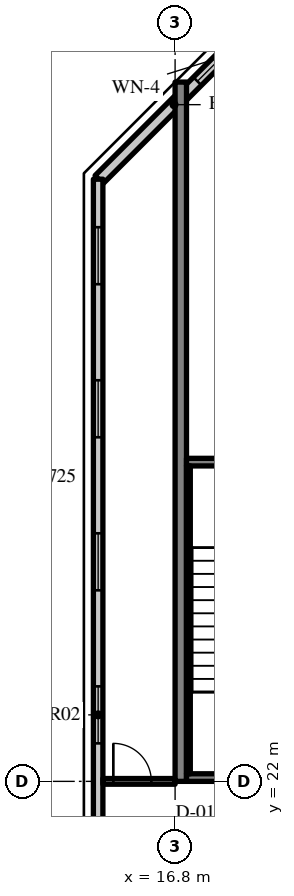
"""IFC4 building model, lengths in metres.
Left out: names, types, materials, properties, quantities, classifications, styles, units other than length and angle.
Written with IfcOpenShell. Run it as: python <this file> out.ifc"""

import sys

from ifc_helpers import new_model, si_unit, direction, frame, frame_2d, origin, place, context, subcontext, project, spatial, rectangle, extrude, source, transform, mapped, element, fill, save


model = new_model("IFC4")
c1 = context("Model", 3, precision=1e-05, world=origin(), true_north=direction((0.0, 1.0)))
c2 = subcontext(c1, "Body", "Model", "MODEL_VIEW")
j1 = project(units=[si_unit("LENGTHUNIT", "METRE"), si_unit("PLANEANGLEUNIT", "RADIAN")], contexts=[c1])
p1 = place(None, origin())
s1 = spatial("IfcSite", under=j1, at=p1, CompositionType="ELEMENT")
p2 = place(p1, origin())
s2 = spatial("IfcBuilding", under=s1, at=p2, CompositionType="ELEMENT")
p3 = place(p2, frame((0.0, 0.0, 237.4)))
s3 = spatial("IfcBuildingStorey", under=s2, at=p3, CompositionType="ELEMENT", Elevation=237.4)
m1 = source(origin(), c2, "Body", "SweptSolid", [
    extrude(rectangle(XDim=18.4, YDim=0.3, at=frame_2d((9.2, 0.0))), origin(), (0.0, 0.0, 1.0), 3.62),
])
p4 = place(p3, frame((16.95, 22.0, 0.0), z_axis=(0.0, 0.0, 1.0), x_axis=(0.0, 1.0, 0.0)))
e1 = element("IfcWall", 1, at=p4, inside=s3, PredefinedType="SHEAR", context=c2, shape_type="MappedRepresentation", body=[
    mapped(m1, transform((0.0, 0.0, 0.0), scale=1.0)),
])
m2 = source(origin(), c2, "Body", "SweptSolid", [
    extrude(rectangle(XDim=5.576, YDim=0.3, at=frame_2d((2.788, 0.0))), origin(), (0.0, 0.0, 1.0), 3.62),
])
p5 = place(p3, frame((18.743, 41.777, 0.0), z_axis=(0.0, 0.0, 1.0), x_axis=(-0.707106781187, -0.707106781187, 0.0)))
e2 = element("IfcWall", 2, at=p5, inside=s3, PredefinedType="SOLIDWALL", context=c2, shape_type="MappedRepresentation", body=[
    mapped(m2, transform((0.0, 0.0, 0.0), scale=1.0)),
])
m3 = source(origin(), c2, "Body", "SweptSolid", [
    extrude(rectangle(XDim=1.8, YDim=1.5, at=frame_2d((0.9, 0.75))), frame((0.0, 0.16, 0.0), z_axis=(0.0, -1.0, 0.0), x_axis=(1.0, 0.0, 0.0)), (0.0, 0.0, 1.0), 0.32),
])
p6 = place(p5, frame((0.118, 0.0, 0.9)))
e3 = element("IfcOpeningElement", 3, at=p6, cuts=e2, PredefinedType="OPENING", context=c2, shape_type="MappedRepresentation", body=[
    mapped(m3, transform((0.0, 0.0, 0.0), scale=1.0)),
])
m4 = source(origin(), c2, "Body", "SweptSolid", [
    extrude(rectangle(XDim=28.189, YDim=0.25, at=frame_2d((14.095, 0.0))), origin(), (0.0, 0.0, 1.0), 3.62),
])
p7 = place(p3, frame((14.775, 37.845, 0.0), z_axis=(0.0, 0.0, 1.0), x_axis=(0.0, -1.0, 0.0)))
e4 = element("IfcWall", 4, at=p7, inside=s3, PredefinedType="SOLIDWALL", context=c2, shape_type="MappedRepresentation", body=[
    mapped(m4, transform((0.0, 0.0, 0.0), scale=1.0)),
])
m5 = source(origin(), c2, "Body", "SweptSolid", [
    extrude(rectangle(XDim=1.5, YDim=1.5, at=frame_2d((0.75, 0.75))), frame((0.0, 0.135, 0.0), z_axis=(0.0, -1.0, 0.0), x_axis=(1.0, 0.0, 0.0)), (0.0, 0.0, 1.0), 0.27),
])
p8 = place(p7, frame((1.263, 0.0, 0.9)))
e5 = element("IfcOpeningElement", 5, at=p8, cuts=e4, PredefinedType="OPENING", context=c2, shape_type="MappedRepresentation", body=[
    mapped(m5, transform((0.0, 0.0, 0.0), scale=1.0)),
])
p9 = place(p7, frame((5.291, 0.0, 0.9)))
e6 = element("IfcOpeningElement", 6, at=p9, cuts=e4, PredefinedType="OPENING", context=c2, shape_type="MappedRepresentation", body=[
    mapped(m5, transform((0.0, 0.0, 0.0), scale=1.0)),
])
p10 = place(p7, frame((9.318, 0.0, 0.9)))
e7 = element("IfcOpeningElement", 7, at=p10, cuts=e4, PredefinedType="OPENING", context=c2, shape_type="MappedRepresentation", body=[
    mapped(m5, transform((0.0, 0.0, 0.0), scale=1.0)),
])
p11 = place(p7, frame((13.345, 0.0, 0.9)))
e8 = element("IfcOpeningElement", 8, at=p11, cuts=e4, PredefinedType="OPENING", context=c2, shape_type="MappedRepresentation", body=[
    mapped(m5, transform((0.0, 0.0, 0.0), scale=1.0)),
])
p12 = place(p7, frame((17.372, 0.0, 0.9)))
e9 = element("IfcOpeningElement", 9, at=p12, cuts=e4, PredefinedType="OPENING", context=c2, shape_type="MappedRepresentation", body=[
    mapped(m5, transform((0.0, 0.0, 0.0), scale=1.0)),
])
p13 = place(p7, frame((21.399, 0.0, 0.9)))
e10 = element("IfcOpeningElement", 10, at=p13, cuts=e4, PredefinedType="OPENING", context=c2, shape_type="MappedRepresentation", body=[
    mapped(m5, transform((0.0, 0.0, 0.0), scale=1.0)),
])
p14 = place(p7, frame((25.426, 0.0, 0.9)))
e11 = element("IfcOpeningElement", 11, at=p14, cuts=e4, PredefinedType="OPENING", context=c2, shape_type="MappedRepresentation", body=[
    mapped(m5, transform((0.0, 0.0, 0.0), scale=1.0)),
])
m6 = source(origin(), c2, "Body", "SweptSolid", [
    extrude(rectangle(XDim=8.1, YDim=0.2, at=frame_2d((4.05, 0.0))), origin(), (0.0, 0.0, 1.0), 3.62),
])
p15 = place(p3, frame((17.1, 22.1, 0.0), z_axis=(0.0, 0.0, 1.0), x_axis=(1.0, 0.0, 0.0)))
e12 = element("IfcWall", 12, at=p15, inside=s3, PredefinedType="SOLIDWALL", context=c2, shape_type="MappedRepresentation", body=[
    mapped(m6, transform((0.0, 0.0, 0.0), scale=1.0)),
])
m7 = source(origin(), c2, "Body", "SweptSolid", [
    extrude(rectangle(XDim=1.2, YDim=2.1, at=frame_2d((0.6, 1.05))), frame((0.0, 0.11, 0.0), z_axis=(0.0, -1.0, 0.0), x_axis=(1.0, 0.0, 0.0)), (0.0, 0.0, 1.0), 0.22),
])
p16 = place(p15, frame((5.9, 0.0, 0.0)))
e13 = element("IfcOpeningElement", 13, at=p16, cuts=e12, PredefinedType="OPENING", context=c2, shape_type="MappedRepresentation", body=[
    mapped(m7, transform((0.0, 0.0, 0.0), scale=1.0)),
])
p17 = place(p3, frame((17.1, 30.4, 0.0), z_axis=(0.0, 0.0, 1.0), x_axis=(1.0, 0.0, 0.0)))
e14 = element("IfcWall", 14, at=p17, inside=s3, PredefinedType="SOLIDWALL", context=c2, shape_type="MappedRepresentation", body=[
    mapped(m6, transform((0.0, 0.0, 0.0), scale=1.0)),
])
m8 = source(origin(), c2, "Body", "SweptSolid", [
    extrude(rectangle(XDim=1.0, YDim=2.1, at=frame_2d((0.5, 1.05))), frame((0.0, 0.11, 0.0), z_axis=(0.0, -1.0, 0.0), x_axis=(1.0, 0.0, 0.0)), (0.0, 0.0, 1.0), 0.22),
])
p18 = place(p17, frame((6.0, 0.0, 0.0)))
e15 = element("IfcOpeningElement", 15, at=p18, cuts=e14, PredefinedType="OPENING", context=c2, shape_type="MappedRepresentation", body=[
    mapped(m8, transform((0.0, 0.0, 0.0), scale=1.0)),
])
m9 = source(origin(), c2, "Body", "SweptSolid", [
    extrude(rectangle(XDim=8.1, YDim=0.1, at=frame_2d((4.05, 0.0))), origin(), (0.0, 0.0, 1.0), 3.62),
])
p19 = place(p3, frame((17.15, 22.2, 0.0), z_axis=(0.0, 0.0, 1.0), x_axis=(0.0, 1.0, 0.0)))
e16 = element("IfcWall", 16, at=p19, inside=s3, PredefinedType="SOLIDWALL", context=c2, shape_type="MappedRepresentation", body=[
    mapped(m9, transform((0.0, 0.0, 0.0), scale=1.0)),
])
m10 = source(origin(), c2, "Body", "SweptSolid", [
    extrude(rectangle(XDim=1.9, YDim=0.15, at=frame_2d((0.95, 0.0))), origin(), (0.0, 0.0, 1.0), 2.92),
])
p20 = place(p3, frame((14.9, 22.0, 0.0), z_axis=(0.0, 0.0, 1.0), x_axis=(1.0, 0.0, 0.0)))
e17 = element("IfcWall", 17, at=p20, inside=s3, PredefinedType="PARTITIONING", context=c2, shape_type="MappedRepresentation", body=[
    mapped(m10, transform((0.0, 0.0, 0.0), scale=1.0)),
])
m11 = source(origin(), c2, "Body", "SweptSolid", [
    extrude(rectangle(XDim=1.0, YDim=2.1, at=frame_2d((0.5, 1.05))), frame((0.0, 0.085, 0.0), z_axis=(0.0, -1.0, 0.0), x_axis=(1.0, 0.0, 0.0)), (0.0, 0.0, 1.0), 0.17),
])
p21 = place(p20, frame((0.275, 0.0, 0.0)))
e18 = element("IfcOpeningElement", 18, at=p21, cuts=e17, PredefinedType="OPENING", context=c2, shape_type="MappedRepresentation", body=[
    mapped(m11, transform((0.0, 0.0, 0.0), scale=1.0)),
])
m12 = source(origin(), c2, "Body", "SweptSolid", [
    extrude(rectangle(XDim=1.8, YDim=1.5, at=frame_2d((0.9, 0.75))), frame((0.0, 0.03, 0.0), z_axis=(0.0, -1.0, 0.0), x_axis=(1.0, 0.0, 0.0)), (0.0, 0.0, 1.0), 0.06),
])
p22 = place(p6, origin())
e19 = element("IfcWindow", 19, at=p22, inside=s3, PartitioningType="SINGLE_PANEL", PredefinedType="WINDOW", context=c2, shape_type="MappedRepresentation", body=[
    mapped(m12, transform((0.0, 0.0, 0.0), scale=1.0)),
])
fill(e3, e19)
m13 = source(origin(), c2, "Body", "SweptSolid", [
    extrude(rectangle(XDim=1.5, YDim=1.5, at=frame_2d((0.75, 0.75))), frame((0.0, 0.03, 0.0), z_axis=(0.0, -1.0, 0.0), x_axis=(1.0, 0.0, 0.0)), (0.0, 0.0, 1.0), 0.06),
])
p23 = place(p8, origin())
e20 = element("IfcWindow", 20, at=p23, inside=s3, PartitioningType="SINGLE_PANEL", PredefinedType="WINDOW", context=c2, shape_type="MappedRepresentation", body=[
    mapped(m13, transform((0.0, 0.0, 0.0), scale=1.0)),
])
fill(e5, e20)
p24 = place(p9, origin())
e21 = element("IfcWindow", 21, at=p24, inside=s3, PartitioningType="SINGLE_PANEL", PredefinedType="WINDOW", context=c2, shape_type="MappedRepresentation", body=[
    mapped(m13, transform((0.0, 0.0, 0.0), scale=1.0)),
])
fill(e6, e21)
p25 = place(p10, origin())
e22 = element("IfcWindow", 22, at=p25, inside=s3, PartitioningType="SINGLE_PANEL", PredefinedType="WINDOW", context=c2, shape_type="MappedRepresentation", body=[
    mapped(m13, transform((0.0, 0.0, 0.0), scale=1.0)),
])
fill(e7, e22)
p26 = place(p11, origin())
e23 = element("IfcWindow", 23, at=p26, inside=s3, PartitioningType="SINGLE_PANEL", PredefinedType="WINDOW", context=c2, shape_type="MappedRepresentation", body=[
    mapped(m13, transform((0.0, 0.0, 0.0), scale=1.0)),
])
fill(e8, e23)
m14 = source(origin(), c2, "Body", "SweptSolid", [
    extrude(rectangle(XDim=1.0, YDim=2.1, at=frame_2d((0.5, 1.05))), frame((0.0, 0.025, 0.0), z_axis=(0.0, -1.0, 0.0), x_axis=(1.0, 0.0, 0.0)), (0.0, 0.0, 1.0), 0.05),
])
p27 = place(p21, origin())
e24 = element("IfcDoor", 24, at=p27, inside=s3, OperationType="SINGLE_SWING_LEFT", PredefinedType="DOOR", context=c2, shape_type="MappedRepresentation", body=[
    mapped(m14, transform((0.0, 0.0, 0.0), scale=1.0)),
])
fill(e18, e24)
save(model, sys.argv[1])
